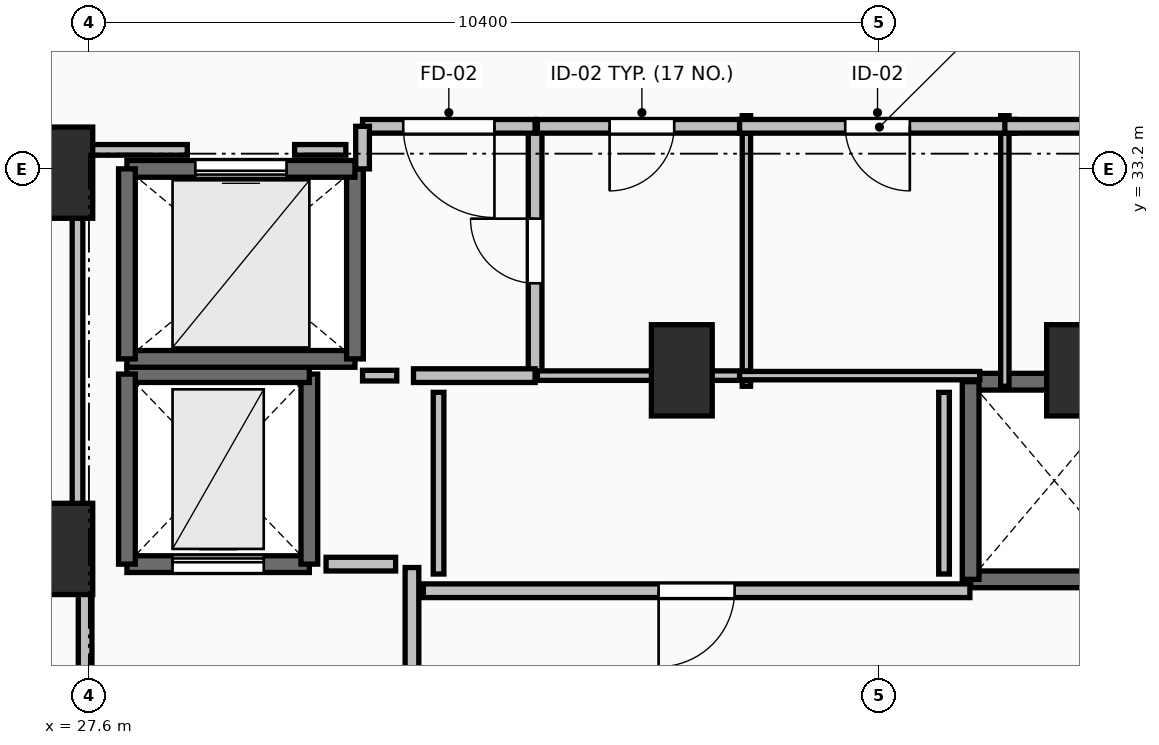
"""IFC4 building model, lengths in metres.
Left out: names, types, materials, properties, quantities, classifications, styles, units other than length and angle.
Written with IfcOpenShell. Run it as: python <this file> out.ifc"""

import sys

from ifc_helpers import new_model, si_unit, direction, frame, frame_2d, origin, origin_2d, place, context, subcontext, project, spatial, rectangle, extrude, element, fill, save


model = new_model("IFC4")
c1 = context("Model", 3, precision=1e-05, world=origin(), true_north=direction((0.0, 1.0)))
c2 = subcontext(c1, "Body", "Model", "MODEL_VIEW")
j1 = project(units=[si_unit("LENGTHUNIT", "METRE"), si_unit("PLANEANGLEUNIT", "RADIAN")], contexts=[c1])
p1 = place(None, origin())
s1 = spatial("IfcSite", under=j1, at=p1, CompositionType="ELEMENT")
p2 = place(p1, origin())
s2 = spatial("IfcBuilding", under=s1, at=p2, CompositionType="ELEMENT")
p3 = place(p2, frame((0.0, 0.0, 167.6)))
s3 = spatial("IfcBuildingStorey", under=s2, at=p3, CompositionType="ELEMENT", Elevation=167.6)
for number, where, z_axis, x_axis in (
    (1, (27.25, 28.2, 0.0), (0.0, 0.0, 1.0), (1.0, 0.0, 0.0)),
    (2, (27.25, 33.15, 0.0), (0.0, 0.0, 1.0), (1.0, 0.0, 0.0)),
    (3, (35.4, 30.55, 0.0), (0.0, 0.0, 1.0), (1.0, 0.0, 0.0)),
    (4, (40.6, 30.55, 0.0), (0.0, 0.0, 1.0), (1.0, 0.0, 0.0)),
):
    element("IfcColumn", number, at=place(p3, frame(where, z_axis=z_axis, x_axis=x_axis)), inside=s3, PredefinedType="PILASTER", context=c2, shape_type="SweptSolid", body=[
        extrude(rectangle(XDim=0.8, YDim=1.2, at=origin_2d()), origin(), (0.0, 0.0, 1.0), 3.5),
    ])
for number, where, z_axis, x_axis in (
    (5, (39.2, 27.8, 0.0), (0.0, 0.0, 1.0), (1.0, 0.0, 0.0)),
    (6, (41.4, 30.4, 0.0), (0.0, 0.0, 1.0), (-1.0, 0.0, 0.0)),
):
    element("IfcWall", number, at=place(p3, frame(where, z_axis=z_axis, x_axis=x_axis)), inside=s3, PredefinedType="SOLIDWALL", context=c2, shape_type="SweptSolid", body=[
        extrude(rectangle(XDim=2.2, YDim=0.22, at=frame_2d((1.1, 0.0))), origin(), (0.0, 0.0, 1.0), 3.24),
    ])
p4 = place(p3, frame((39.2, 30.4, 0.0), z_axis=(0.0, 0.0, 1.0), x_axis=(0.0, -1.0, 0.0)))
e7 = element("IfcWall", 7, at=p4, inside=s3, PredefinedType="SOLIDWALL", context=c2, shape_type="SweptSolid", body=[
    extrude(rectangle(XDim=2.6, YDim=0.22, at=frame_2d((1.3, 0.0))), origin(), (0.0, 0.0, 1.0), 3.24),
])
p5 = place(p3, frame((28.1, 28.0, 0.0), z_axis=(0.0, 0.0, 1.0), x_axis=(1.0, 0.0, 0.0)))
e8 = element("IfcWall", 8, at=p5, inside=s3, PredefinedType="SHEAR", context=c2, shape_type="SweptSolid", body=[
    extrude(rectangle(XDim=2.4, YDim=0.22, at=frame_2d((1.2, 0.0))), origin(), (0.0, 0.0, 1.0), 3.24),
])
p6 = place(p5, frame((0.6, 0.0, 0.0)))
e9 = element("IfcOpeningElement", 9, at=p6, cuts=e8, PredefinedType="OPENING", context=c2, shape_type="SweptSolid", body=[
    extrude(rectangle(XDim=1.2, YDim=2.2, at=frame_2d((0.6, 1.1))), frame((0.0, 0.125, 0.0), z_axis=(0.0, -1.0, 0.0), x_axis=(1.0, 0.0, 0.0)), (0.0, 0.0, 1.0), 0.25),
])
p7 = place(p3, frame((30.5, 28.0, 0.0), z_axis=(0.0, 0.0, 1.0), x_axis=(0.0, 1.0, 0.0)))
e10 = element("IfcWall", 10, at=p7, inside=s3, PredefinedType="SHEAR", context=c2, shape_type="SweptSolid", body=[
    extrude(rectangle(XDim=2.5, YDim=0.22, at=frame_2d((1.25, 0.0))), origin(), (0.0, 0.0, 1.0), 3.24),
])
p8 = place(p3, frame((30.5, 30.5, 0.0), z_axis=(0.0, 0.0, 1.0), x_axis=(-1.0, 0.0, 0.0)))
e11 = element("IfcWall", 11, at=p8, inside=s3, PredefinedType="SHEAR", context=c2, shape_type="SweptSolid", body=[
    extrude(rectangle(XDim=2.4, YDim=0.22, at=frame_2d((1.2, 0.0))), origin(), (0.0, 0.0, 1.0), 3.24),
])
p9 = place(p3, frame((28.1, 30.5, 0.0), z_axis=(0.0, 0.0, 1.0), x_axis=(0.0, -1.0, 0.0)))
e12 = element("IfcWall", 12, at=p9, inside=s3, PredefinedType="SHEAR", context=c2, shape_type="SweptSolid", body=[
    extrude(rectangle(XDim=2.5, YDim=0.22, at=frame_2d((1.25, 0.0))), origin(), (0.0, 0.0, 1.0), 3.24),
])
p10 = place(p3, frame((28.1, 30.7, 0.0), z_axis=(0.0, 0.0, 1.0), x_axis=(1.0, 0.0, 0.0)))
e13 = element("IfcWall", 13, at=p10, inside=s3, PredefinedType="SOLIDWALL", context=c2, shape_type="SweptSolid", body=[
    extrude(rectangle(XDim=3.0, YDim=0.22, at=frame_2d((1.5, 0.0))), origin(), (0.0, 0.0, 1.0), 3.24),
])
p11 = place(p3, frame((31.1, 30.7, 0.0), z_axis=(0.0, 0.0, 1.0), x_axis=(0.0, 1.0, 0.0)))
e14 = element("IfcWall", 14, at=p11, inside=s3, PredefinedType="SOLIDWALL", context=c2, shape_type="SweptSolid", body=[
    extrude(rectangle(XDim=2.5, YDim=0.22, at=frame_2d((1.25, 0.0))), origin(), (0.0, 0.0, 1.0), 3.24),
])
p12 = place(p3, frame((31.1, 33.2, 0.0), z_axis=(0.0, 0.0, 1.0), x_axis=(-1.0, 0.0, 0.0)))
e15 = element("IfcWall", 15, at=p12, inside=s3, PredefinedType="SOLIDWALL", context=c2, shape_type="SweptSolid", body=[
    extrude(rectangle(XDim=3.0, YDim=0.22, at=frame_2d((1.5, 0.0))), origin(), (0.0, 0.0, 1.0), 3.24),
])
p13 = place(p12, frame((0.9, 0.0, 0.0)))
e16 = element("IfcOpeningElement", 16, at=p13, cuts=e15, PredefinedType="OPENING", context=c2, shape_type="SweptSolid", body=[
    extrude(rectangle(XDim=1.2, YDim=2.2, at=frame_2d((0.6, 1.1))), frame((0.0, 0.125, 0.0), z_axis=(0.0, -1.0, 0.0), x_axis=(1.0, 0.0, 0.0)), (0.0, 0.0, 1.0), 0.25),
])
p14 = place(p3, frame((28.1, 33.2, 0.0), z_axis=(0.0, 0.0, 1.0), x_axis=(0.0, -1.0, 0.0)))
e17 = element("IfcWall", 17, at=p14, inside=s3, PredefinedType="SOLIDWALL", context=c2, shape_type="SweptSolid", body=[
    extrude(rectangle(XDim=2.5, YDim=0.22, at=frame_2d((1.25, 0.0))), origin(), (0.0, 0.0, 1.0), 3.24),
])
p15 = place(p3, frame((31.85, 24.045, 0.0), z_axis=(0.0, 0.0, 1.0), x_axis=(0.0, 1.0, 0.0)))
e18 = element("IfcWall", 18, at=p15, inside=s3, PredefinedType="PARTITIONING", context=c2, shape_type="SweptSolid", body=[
    extrude(rectangle(XDim=3.91, YDim=0.18, at=frame_2d((1.955, 0.0))), origin(), (0.0, 0.0, 1.0), 3.24),
])
p16 = place(p15, frame((1.355, 0.0, 0.0)))
e19 = element("IfcOpeningElement", 19, at=p16, cuts=e18, PredefinedType="OPENING", context=c2, shape_type="SweptSolid", body=[
    extrude(rectangle(XDim=1.2, YDim=2.15, at=frame_2d((0.6, 1.075))), frame((0.0, 0.105, 0.0), z_axis=(0.0, -1.0, 0.0), x_axis=(1.0, 0.0, 0.0)), (0.0, 0.0, 1.0), 0.21),
])
p17 = place(p3, frame((27.55, 28.0, 0.0), z_axis=(0.0, 0.0, 1.0), x_axis=(0.0, -1.0, 0.0)))
e20 = element("IfcWall", 20, at=p17, inside=s3, PredefinedType="PARTITIONING", context=c2, shape_type="SweptSolid", body=[
    extrude(rectangle(XDim=4.05, YDim=0.18, at=frame_2d((2.025, 0.0))), origin(), (0.0, 0.0, 1.0), 3.24),
])
p18 = place(p17, frame((1.425, 0.0, 0.0)))
e21 = element("IfcOpeningElement", 21, at=p18, cuts=e20, PredefinedType="OPENING", context=c2, shape_type="SweptSolid", body=[
    extrude(rectangle(XDim=1.2, YDim=2.15, at=frame_2d((0.6, 1.075))), frame((0.0, 0.105, 0.0), z_axis=(0.0, -1.0, 0.0), x_axis=(1.0, 0.0, 0.0)), (0.0, 0.0, 1.0), 0.21),
])
p19 = place(p3, frame((33.47, 30.48, 0.0), z_axis=(0.0, 0.0, 1.0), x_axis=(0.0, 1.0, 0.0)))
e22 = element("IfcWall", 22, at=p19, inside=s3, PredefinedType="PARTITIONING", context=c2, shape_type="SweptSolid", body=[
    extrude(rectangle(XDim=3.28, YDim=0.18, at=frame_2d((1.64, 0.0))), origin(), (0.0, 0.0, 1.0), 3.24),
])
p20 = place(p19, frame((1.215, 0.0, 0.0)))
e23 = element("IfcOpeningElement", 23, at=p20, cuts=e22, PredefinedType="OPENING", context=c2, shape_type="SweptSolid", body=[
    extrude(rectangle(XDim=0.85, YDim=2.1, at=frame_2d((0.425, 1.05))), frame((0.0, 0.105, 0.0), z_axis=(0.0, -1.0, 0.0), x_axis=(1.0, 0.0, 0.0)), (0.0, 0.0, 1.0), 0.21),
])
p21 = place(p3, frame((31.87, 30.48, 0.0), z_axis=(0.0, 0.0, 1.0), x_axis=(1.0, 0.0, 0.0)))
e24 = element("IfcWall", 24, at=p21, inside=s3, PredefinedType="PARTITIONING", context=c2, shape_type="SweptSolid", body=[
    extrude(rectangle(XDim=1.6, YDim=0.18, at=frame_2d((0.8, 0.0))), origin(), (0.0, 0.0, 1.0), 3.24),
])
p22 = place(p3, frame((33.47, 33.76, 0.0), z_axis=(0.0, 0.0, 1.0), x_axis=(-1.0, 0.0, 0.0)))
e25 = element("IfcWall", 25, at=p22, inside=s3, PredefinedType="PARTITIONING", context=c2, shape_type="SweptSolid", body=[
    extrude(rectangle(XDim=2.27, YDim=0.18, at=frame_2d((1.135, 0.0))), origin(), (0.0, 0.0, 1.0), 3.24),
])
p23 = place(p22, frame((0.535, 0.0, 0.0)))
e26 = element("IfcOpeningElement", 26, at=p23, cuts=e25, PredefinedType="OPENING", context=c2, shape_type="SweptSolid", body=[
    extrude(rectangle(XDim=1.2, YDim=2.15, at=frame_2d((0.6, 1.075))), frame((0.0, 0.105, 0.0), z_axis=(0.0, -1.0, 0.0), x_axis=(1.0, 0.0, 0.0)), (0.0, 0.0, 1.0), 0.21),
])
p24 = place(p3, frame((31.2, 33.76, 0.0), z_axis=(0.0, 0.0, 1.0), x_axis=(0.0, -1.0, 0.0)))
e27 = element("IfcWall", 27, at=p24, inside=s3, PredefinedType="PARTITIONING", context=c2, shape_type="SweptSolid", body=[
    extrude(rectangle(XDim=0.56, YDim=0.18, at=frame_2d((0.28, 0.0))), origin(), (0.0, 0.0, 1.0), 3.24),
])
p25 = place(p3, frame((39.19, 27.65, 0.0), z_axis=(0.0, 0.0, 1.0), x_axis=(-1.0, 0.0, 0.0)))
e28 = element("IfcWall", 28, at=p25, inside=s3, PredefinedType="PARTITIONING", context=c2, shape_type="SweptSolid", body=[
    extrude(rectangle(XDim=7.19, YDim=0.18, at=frame_2d((3.595, 0.0))), origin(), (0.0, 0.0, 1.0), 3.24),
])
p26 = place(p25, frame((3.095, 0.0, 0.0)))
e29 = element("IfcOpeningElement", 29, at=p26, cuts=e28, PredefinedType="OPENING", context=c2, shape_type="SweptSolid", body=[
    extrude(rectangle(XDim=1.0, YDim=2.15, at=frame_2d((0.5, 1.075))), frame((0.0, 0.105, 0.0), z_axis=(0.0, -1.0, 0.0), x_axis=(1.0, 0.0, 0.0)), (0.0, 0.0, 1.0), 0.21),
])
p27 = place(p3, frame((36.25, 30.34, 0.0), z_axis=(0.0, 0.0, 1.0), x_axis=(0.0, 1.0, 0.0)))
e30 = element("IfcWall", 30, at=p27, inside=s3, PredefinedType="PARTITIONING", context=c2, shape_type="SweptSolid", body=[
    extrude(rectangle(XDim=3.56, YDim=0.11, at=frame_2d((1.78, 0.0))), origin(), (0.0, 0.0, 1.0), 2.432),
])
p28 = place(p3, frame((33.5, 30.48, 0.0), z_axis=(0.0, 0.0, 1.0), x_axis=(1.0, 0.0, 0.0)))
e31 = element("IfcWall", 31, at=p28, inside=s3, PredefinedType="PARTITIONING", context=c2, shape_type="SweptSolid", body=[
    extrude(rectangle(XDim=2.75, YDim=0.125, at=frame_2d((1.375, 0.0))), origin(), (0.0, 0.0, 1.0), 2.432),
])
p29 = place(p3, frame((36.25, 33.76, 0.0), z_axis=(0.0, 0.0, 1.0), x_axis=(-1.0, 0.0, 0.0)))
e32 = element("IfcWall", 32, at=p29, inside=s3, PredefinedType="PARTITIONING", context=c2, shape_type="SweptSolid", body=[
    extrude(rectangle(XDim=2.75, YDim=0.18, at=frame_2d((1.375, 0.0))), origin(), (0.0, 0.0, 1.0), 3.24),
])
p30 = place(p29, frame((0.95, 0.0, 0.0)))
e33 = element("IfcOpeningElement", 33, at=p30, cuts=e32, PredefinedType="OPENING", context=c2, shape_type="SweptSolid", body=[
    extrude(rectangle(XDim=0.85, YDim=2.1, at=frame_2d((0.425, 1.05))), frame((0.0, 0.105, 0.0), z_axis=(0.0, -1.0, 0.0), x_axis=(1.0, 0.0, 0.0)), (0.0, 0.0, 1.0), 0.21),
])
p31 = place(p3, frame((39.65, 30.34, 0.0), z_axis=(0.0, 0.0, 1.0), x_axis=(0.0, 1.0, 0.0)))
e34 = element("IfcWall", 34, at=p31, inside=s3, PredefinedType="PARTITIONING", context=c2, shape_type="SweptSolid", body=[
    extrude(rectangle(XDim=3.56, YDim=0.11, at=frame_2d((1.78, 0.0))), origin(), (0.0, 0.0, 1.0), 2.432),
])
p32 = place(p3, frame((36.16, 30.48, 0.0), z_axis=(0.0, 0.0, 1.0), x_axis=(1.0, 0.0, 0.0)))
e35 = element("IfcWall", 35, at=p32, inside=s3, PredefinedType="PARTITIONING", context=c2, shape_type="SweptSolid", body=[
    extrude(rectangle(XDim=3.16, YDim=0.11, at=frame_2d((1.58, 0.0))), origin(), (0.0, 0.0, 1.0), 2.432),
])
p33 = place(p3, frame((39.79, 33.76, 0.0), z_axis=(0.0, 0.0, 1.0), x_axis=(-1.0, 0.0, 0.0)))
e36 = element("IfcWall", 36, at=p33, inside=s3, PredefinedType="PARTITIONING", context=c2, shape_type="SweptSolid", body=[
    extrude(rectangle(XDim=3.63, YDim=0.18, at=frame_2d((1.815, 0.0))), origin(), (0.0, 0.0, 1.0), 3.24),
])
p34 = place(p33, frame((1.39, 0.0, 0.0)))
e37 = element("IfcOpeningElement", 37, at=p34, cuts=e36, PredefinedType="OPENING", context=c2, shape_type="SweptSolid", body=[
    extrude(rectangle(XDim=0.85, YDim=2.1, at=frame_2d((0.425, 1.05))), frame((0.0, 0.105, 0.0), z_axis=(0.0, -1.0, 0.0), x_axis=(1.0, 0.0, 0.0)), (0.0, 0.0, 1.0), 0.21),
])
p35 = place(p3, frame((44.26, 33.76, 0.0), z_axis=(0.0, 0.0, 1.0), x_axis=(-1.0, 0.0, 0.0)))
e38 = element("IfcWall", 38, at=p35, inside=s3, PredefinedType="PARTITIONING", context=c2, shape_type="SweptSolid", body=[
    extrude(rectangle(XDim=4.61, YDim=0.18, at=frame_2d((2.305, 0.0))), origin(), (0.0, 0.0, 1.0), 3.24),
])
p36 = place(p35, frame((1.88, 0.0, 0.0)))
e39 = element("IfcOpeningElement", 39, at=p36, cuts=e38, PredefinedType="OPENING", context=c2, shape_type="SweptSolid", body=[
    extrude(rectangle(XDim=0.85, YDim=2.1, at=frame_2d((0.425, 1.05))), frame((0.0, 0.105, 0.0), z_axis=(0.0, -1.0, 0.0), x_axis=(1.0, 0.0, 0.0)), (0.0, 0.0, 1.0), 0.21),
])
p37 = place(p3, frame((31.635, 28.0, 0.0), z_axis=(0.0, 0.0, 1.0), x_axis=(-1.0, 0.0, 0.0)))
e40 = element("IfcWall", 40, at=p37, inside=s3, PredefinedType="PARTITIONING", context=c2, shape_type="SweptSolid", body=[
    extrude(rectangle(XDim=0.915, YDim=0.18, at=frame_2d((0.458, 0.0))), origin(), (0.0, 0.0, 1.0), 3.24),
])
p38 = place(p3, frame((31.2, 30.48, 0.0), z_axis=(0.0, 0.0, 1.0), x_axis=(1.0, 0.0, 0.0)))
e41 = element("IfcWall", 41, at=p38, inside=s3, PredefinedType="PARTITIONING", context=c2, shape_type="SweptSolid", body=[
    extrude(rectangle(XDim=0.45, YDim=0.14, at=frame_2d((0.225, 0.0))), origin(), (0.0, 0.0, 1.0), 3.24),
])
for number, where, z_axis, x_axis in (
    (42, (32.2, 30.26, 0.0), (0.0, 0.0, 1.0), (0.0, -1.0, 0.0)),
    (43, (38.85, 27.87, 0.0), (0.0, 0.0, 1.0), (0.0, 1.0, 0.0)),
):
    element("IfcWall", number, at=place(p3, frame(where, z_axis=z_axis, x_axis=x_axis)), inside=s3, PredefinedType="PARTITIONING", context=c2, shape_type="SweptSolid", body=[
        extrude(rectangle(XDim=2.39, YDim=0.14, at=frame_2d((1.195, 0.0))), origin(), (0.0, 0.0, 1.0), 3.24),
    ])
p39 = place(p3, frame((30.98, 33.45, 0.0), z_axis=(0.0, 0.0, 1.0), x_axis=(-1.0, 0.0, 0.0)))
e44 = element("IfcWall", 44, at=p39, inside=s3, PredefinedType="PARTITIONING", context=c2, shape_type="SweptSolid", body=[
    extrude(rectangle(XDim=0.674, YDim=0.14, at=frame_2d((0.337, 0.0))), origin(), (0.0, 0.0, 1.0), 3.24),
])
p40 = place(p3, frame((28.894, 33.45, 0.0), z_axis=(0.0, 0.0, 1.0), x_axis=(-1.0, 0.0, 0.0)))
e45 = element("IfcWall", 45, at=p40, inside=s3, PredefinedType="PARTITIONING", context=c2, shape_type="SweptSolid", body=[
    extrude(rectangle(XDim=1.444, YDim=0.14, at=frame_2d((0.722, 0.0))), origin(), (0.0, 0.0, 1.0), 2.432),
])
p41 = place(p3, frame((27.45, 33.45, 0.0), z_axis=(0.0, 0.0, 1.0), x_axis=(0.0, -1.0, 0.0)))
e46 = element("IfcWall", 46, at=p41, inside=s3, PredefinedType="PARTITIONING", context=c2, shape_type="SweptSolid", body=[
    extrude(rectangle(XDim=5.254, YDim=0.14, at=frame_2d((2.627, 0.0))), origin(), (0.0, 0.0, 1.0), 2.432),
])
p42 = place(p6, origin())
e47 = element("IfcDoor", 47, at=p42, inside=s3, OperationType="SLIDING_TO_LEFT", PredefinedType="DOOR", context=c2, shape_type="SweptSolid", body=[
    extrude(rectangle(XDim=1.2, YDim=2.2, at=frame_2d((0.6, 1.1))), frame((0.0, 0.025, 0.0), z_axis=(0.0, -1.0, 0.0), x_axis=(1.0, 0.0, 0.0)), (0.0, 0.0, 1.0), 0.05),
])
fill(e9, e47)
p43 = place(p13, origin())
e48 = element("IfcDoor", 48, at=p43, inside=s3, OperationType="SLIDING_TO_LEFT", PredefinedType="DOOR", context=c2, shape_type="SweptSolid", body=[
    extrude(rectangle(XDim=1.2, YDim=2.2, at=frame_2d((0.6, 1.1))), frame((0.0, 0.025, 0.0), z_axis=(0.0, -1.0, 0.0), x_axis=(1.0, 0.0, 0.0)), (0.0, 0.0, 1.0), 0.05),
])
fill(e16, e48)
p44 = place(p20, origin())
e49 = element("IfcDoor", 49, at=p44, inside=s3, OperationType="SINGLE_SWING_RIGHT", PredefinedType="DOOR", context=c2, shape_type="SweptSolid", body=[
    extrude(rectangle(XDim=0.85, YDim=2.1, at=frame_2d((0.425, 1.05))), frame((0.0, 0.025, 0.0), z_axis=(0.0, -1.0, 0.0), x_axis=(1.0, 0.0, 0.0)), (0.0, 0.0, 1.0), 0.05),
])
fill(e23, e49)
p45 = place(p23, origin())
e50 = element("IfcDoor", 50, at=p45, inside=s3, OperationType="SINGLE_SWING_LEFT", PredefinedType="DOOR", context=c2, shape_type="SweptSolid", body=[
    extrude(rectangle(XDim=1.2, YDim=2.15, at=frame_2d((0.6, 1.075))), frame((0.0, 0.025, 0.0), z_axis=(0.0, -1.0, 0.0), x_axis=(1.0, 0.0, 0.0)), (0.0, 0.0, 1.0), 0.05),
])
fill(e26, e50)
p46 = place(p26, origin())
e51 = element("IfcDoor", 51, at=p46, inside=s3, OperationType="SINGLE_SWING_RIGHT", PredefinedType="DOOR", context=c2, shape_type="SweptSolid", body=[
    extrude(rectangle(XDim=1.0, YDim=2.15, at=frame_2d((0.5, 1.075))), frame((0.0, 0.025, 0.0), z_axis=(0.0, -1.0, 0.0), x_axis=(1.0, 0.0, 0.0)), (0.0, 0.0, 1.0), 0.05),
])
fill(e29, e51)
p47 = place(p30, origin())
e52 = element("IfcDoor", 52, at=p47, inside=s3, OperationType="SINGLE_SWING_RIGHT", PredefinedType="DOOR", context=c2, shape_type="SweptSolid", body=[
    extrude(rectangle(XDim=0.85, YDim=2.1, at=frame_2d((0.425, 1.05))), frame((0.0, 0.025, 0.0), z_axis=(0.0, -1.0, 0.0), x_axis=(1.0, 0.0, 0.0)), (0.0, 0.0, 1.0), 0.05),
])
fill(e33, e52)
p48 = place(p34, origin())
e53 = element("IfcDoor", 53, at=p48, inside=s3, OperationType="SINGLE_SWING_LEFT", PredefinedType="DOOR", context=c2, shape_type="SweptSolid", body=[
    extrude(rectangle(XDim=0.85, YDim=2.1, at=frame_2d((0.425, 1.05))), frame((0.0, 0.025, 0.0), z_axis=(0.0, -1.0, 0.0), x_axis=(1.0, 0.0, 0.0)), (0.0, 0.0, 1.0), 0.05),
])
fill(e37, e53)
save(model, sys.argv[1])
